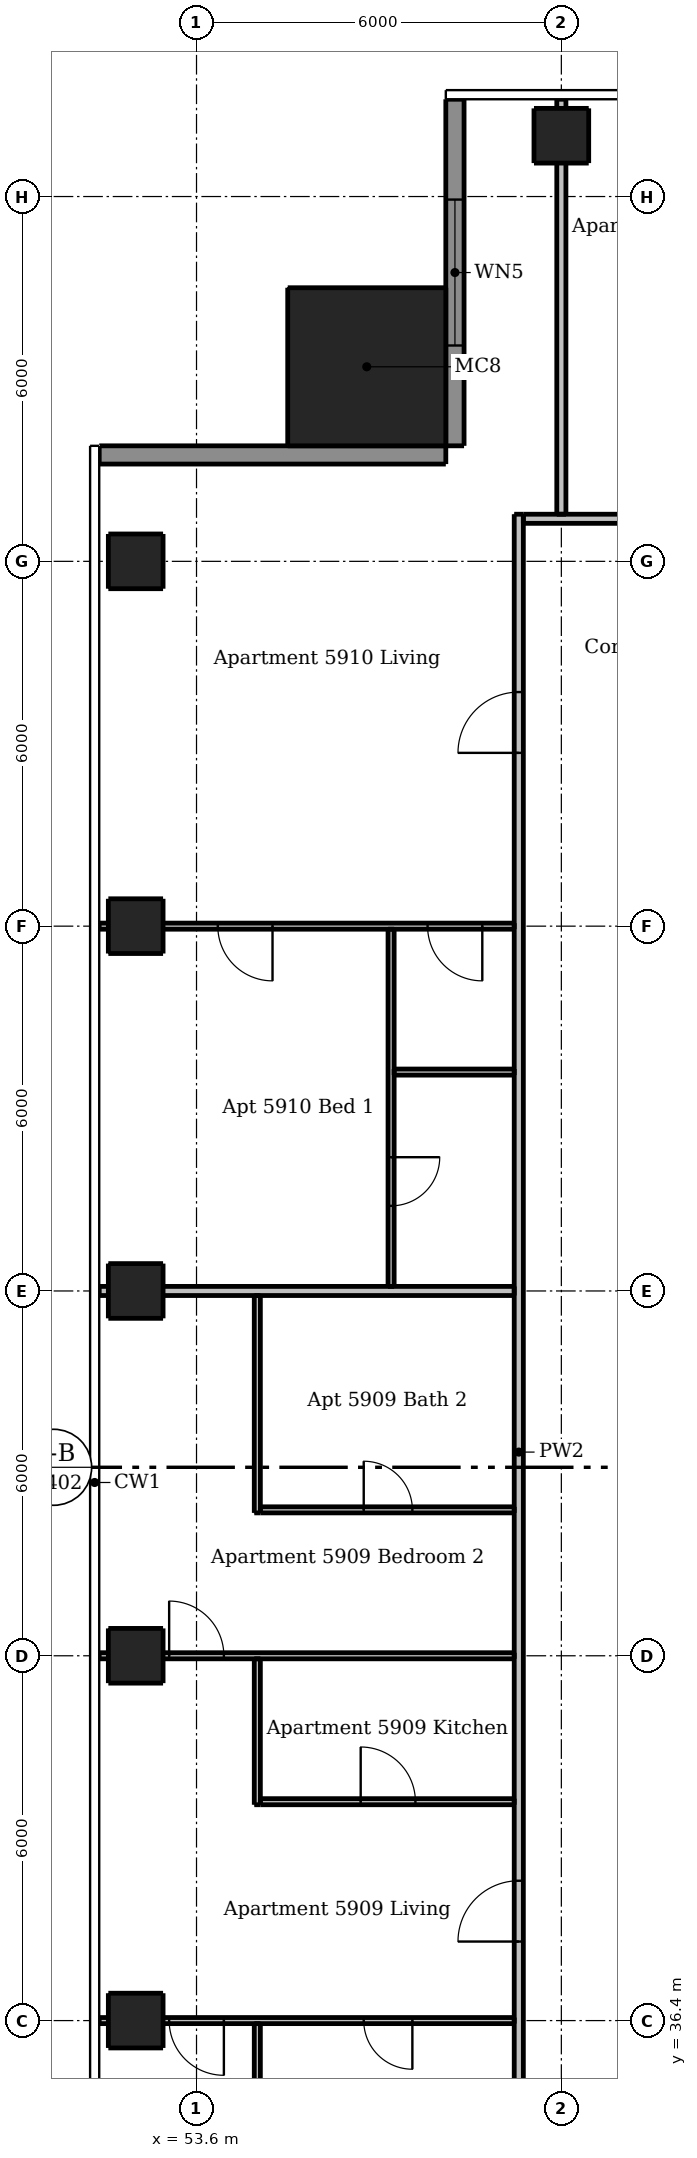
"""IFC4 building model, lengths in metres.
Left out: names, types, materials, properties, quantities, classifications, styles, units other than length and angle.
Written with IfcOpenShell. Run it as: python <this file> out.ifc"""

import sys

from ifc_helpers import new_model, si_unit, direction, frame, frame_2d, origin, origin_2d, place, context, subcontext, project, spatial, rectangle, extrude, element, fill, save


model = new_model("IFC4")
c1 = context("Model", 3, precision=1e-05, world=origin(), true_north=direction((0.0, 1.0)))
c2 = subcontext(c1, "Body", "Model", "MODEL_VIEW")
j1 = project(units=[si_unit("LENGTHUNIT", "METRE"), si_unit("PLANEANGLEUNIT", "RADIAN")], contexts=[c1])
p1 = place(None, origin())
s1 = spatial("IfcSite", under=j1, at=p1, CompositionType="ELEMENT")
p2 = place(p1, origin())
s2 = spatial("IfcBuilding", under=s1, at=p2, CompositionType="ELEMENT")
p3 = place(p2, frame((0.0, 0.0, 220.0)))
s3 = spatial("IfcBuildingStorey", under=s2, at=p3, CompositionType="ELEMENT", Elevation=220.0)
for number, where, z_axis, x_axis in (
    (1, (59.6, 67.4, 0.0), (0.0, 0.0, 1.0), (1.0, 0.0, 0.0)),
    (2, (52.6, 36.4, 0.0), (0.0, 0.0, 1.0), (1.0, 0.0, 0.0)),
    (3, (52.6, 42.4, 0.0), (0.0, 0.0, 1.0), (1.0, 0.0, 0.0)),
    (4, (52.6, 48.4, 0.0), (0.0, 0.0, 1.0), (1.0, 0.0, 0.0)),
    (5, (52.6, 54.4, 0.0), (0.0, 0.0, 1.0), (1.0, 0.0, 0.0)),
    (6, (52.6, 60.4, 0.0), (0.0, 0.0, 1.0), (1.0, 0.0, 0.0)),
):
    element("IfcColumn", number, at=place(p3, frame(where, z_axis=z_axis, x_axis=x_axis)), inside=s3, PredefinedType="COLUMN", context=c2, shape_type="SweptSolid", body=[
        extrude(rectangle(XDim=0.9, YDim=0.9, at=origin_2d()), origin(), (0.0, 0.0, 1.0), 3.05),
    ])
p4 = place(p3, frame((56.4, 63.6, 0.0), z_axis=(0.0, 0.0, 1.0), x_axis=(1.0, 0.0, 0.0)))
e7 = element("IfcColumn", 7, at=p4, inside=s3, PredefinedType="COLUMN", context=c2, shape_type="SweptSolid", body=[
    extrude(rectangle(XDim=2.6, YDim=2.6, at=origin_2d()), origin(), (0.0, 0.0, 1.0), 3.3),
])
p5 = place(p3, frame((57.85, 68.0, 0.0), z_axis=(0.0, 0.0, 1.0), x_axis=(0.0, -1.0, 0.0)))
e8 = element("IfcWall", 8, at=p5, inside=s3, PredefinedType="SOLIDWALL", context=c2, shape_type="SweptSolid", body=[
    extrude(rectangle(XDim=5.7, YDim=0.3, at=frame_2d((2.85, 0.0))), origin(), (0.0, 0.0, 1.0), 3.05),
])
p6 = place(p5, frame((1.65, 0.0, 0.15)))
e9 = element("IfcOpeningElement", 9, at=p6, cuts=e8, PredefinedType="OPENING", context=c2, shape_type="SweptSolid", body=[
    extrude(rectangle(XDim=2.4, YDim=2.1, at=frame_2d((1.2, 1.05))), frame((0.0, 0.16, 0.0), z_axis=(0.0, -1.0, 0.0), x_axis=(1.0, 0.0, 0.0)), (0.0, 0.0, 1.0), 0.32),
])
p7 = place(p3, frame((57.7, 62.15, 0.0), z_axis=(0.0, 0.0, 1.0), x_axis=(-1.0, 0.0, 0.0)))
e10 = element("IfcWall", 10, at=p7, inside=s3, PredefinedType="SOLIDWALL", context=c2, shape_type="SweptSolid", body=[
    extrude(rectangle(XDim=5.7, YDim=0.3, at=frame_2d((2.85, 0.0))), origin(), (0.0, 0.0, 1.0), 3.05),
])
p8 = place(p3, frame((54.6, 32.75, 0.0), z_axis=(0.0, 0.0, 1.0), x_axis=(0.0, 1.0, 0.0)))
e11 = element("IfcWall", 11, at=p8, inside=s3, PredefinedType="PARTITIONING", context=c2, shape_type="SweptSolid", body=[
    extrude(rectangle(XDim=3.6, YDim=0.1, at=frame_2d((1.8, 0.0))), origin(), (0.0, 0.0, 1.0), 3.05),
])
p9 = place(p3, frame((54.6, 39.95, 0.0), z_axis=(0.0, 0.0, 1.0), x_axis=(0.0, 1.0, 0.0)))
e12 = element("IfcWall", 12, at=p9, inside=s3, PredefinedType="PARTITIONING", context=c2, shape_type="SweptSolid", body=[
    extrude(rectangle(XDim=2.4, YDim=0.1, at=frame_2d((1.2, 0.0))), origin(), (0.0, 0.0, 1.0), 3.05),
])
p10 = place(p3, frame((54.6, 44.75, 0.0), z_axis=(0.0, 0.0, 1.0), x_axis=(0.0, 1.0, 0.0)))
e13 = element("IfcWall", 13, at=p10, inside=s3, PredefinedType="PARTITIONING", context=c2, shape_type="SweptSolid", body=[
    extrude(rectangle(XDim=3.575, YDim=0.1, at=frame_2d((1.788, 0.0))), origin(), (0.0, 0.0, 1.0), 3.05),
])
p11 = place(p3, frame((56.8, 54.35, 0.0), z_axis=(0.0, 0.0, 1.0), x_axis=(0.0, -1.0, 0.0)))
e14 = element("IfcWall", 14, at=p11, inside=s3, PredefinedType="PARTITIONING", context=c2, shape_type="SweptSolid", body=[
    extrude(rectangle(XDim=5.875, YDim=0.1, at=frame_2d((2.938, 0.0))), origin(), (0.0, 0.0, 1.0), 3.05),
])
p12 = place(p11, frame((3.75, 0.0, 0.0)))
e15 = element("IfcOpeningElement", 15, at=p12, cuts=e14, PredefinedType="OPENING", context=c2, shape_type="SweptSolid", body=[
    extrude(rectangle(XDim=0.8, YDim=2.1, at=frame_2d((0.4, 1.05))), frame((0.0, 0.06, 0.0), z_axis=(0.0, -1.0, 0.0), x_axis=(1.0, 0.0, 0.0)), (0.0, 0.0, 1.0), 0.12),
])
p13 = place(p3, frame((58.825, 54.4, 0.0), z_axis=(0.0, 0.0, 1.0), x_axis=(-1.0, 0.0, 0.0)))
e16 = element("IfcWall", 16, at=p13, inside=s3, PredefinedType="PARTITIONING", context=c2, shape_type="SweptSolid", body=[
    extrude(rectangle(XDim=6.825, YDim=0.1, at=frame_2d((3.413, 0.0))), origin(), (0.0, 0.0, 1.0), 2.516),
])
p14 = place(p13, frame((0.525, 0.0, 0.0)))
e17 = element("IfcOpeningElement", 17, at=p14, cuts=e16, PredefinedType="OPENING", context=c2, shape_type="SweptSolid", body=[
    extrude(rectangle(XDim=0.9, YDim=2.1, at=frame_2d((0.45, 1.05))), frame((0.0, 0.06, 0.0), z_axis=(0.0, -1.0, 0.0), x_axis=(1.0, 0.0, 0.0)), (0.0, 0.0, 1.0), 0.12),
])
p15 = place(p13, frame((3.975, 0.0, 0.0)))
e18 = element("IfcOpeningElement", 18, at=p15, cuts=e16, PredefinedType="OPENING", context=c2, shape_type="SweptSolid", body=[
    extrude(rectangle(XDim=0.9, YDim=2.1, at=frame_2d((0.45, 1.05))), frame((0.0, 0.06, 0.0), z_axis=(0.0, -1.0, 0.0), x_axis=(1.0, 0.0, 0.0)), (0.0, 0.0, 1.0), 0.12),
])
p16 = place(p3, frame((56.85, 52.0, 0.0), z_axis=(0.0, 0.0, 1.0), x_axis=(1.0, 0.0, 0.0)))
e19 = element("IfcWall", 19, at=p16, inside=s3, PredefinedType="PARTITIONING", context=c2, shape_type="SweptSolid", body=[
    extrude(rectangle(XDim=1.975, YDim=0.1, at=frame_2d((0.987, 0.0))), origin(), (0.0, 0.0, 1.0), 3.05),
])
p17 = place(p3, frame((54.65, 44.8, 0.0), z_axis=(0.0, 0.0, 1.0), x_axis=(1.0, 0.0, 0.0)))
e20 = element("IfcWall", 20, at=p17, inside=s3, PredefinedType="PARTITIONING", context=c2, shape_type="SweptSolid", body=[
    extrude(rectangle(XDim=4.175, YDim=0.1, at=frame_2d((2.087, 0.0))), origin(), (0.0, 0.0, 1.0), 3.05),
])
p18 = place(p17, frame((1.7, 0.0, 0.0)))
e21 = element("IfcOpeningElement", 21, at=p18, cuts=e20, PredefinedType="OPENING", context=c2, shape_type="SweptSolid", body=[
    extrude(rectangle(XDim=0.8, YDim=2.1, at=frame_2d((0.4, 1.05))), frame((0.0, 0.06, 0.0), z_axis=(0.0, -1.0, 0.0), x_axis=(1.0, 0.0, 0.0)), (0.0, 0.0, 1.0), 0.12),
])
p19 = place(p3, frame((52.0, 42.4, 0.0), z_axis=(0.0, 0.0, 1.0), x_axis=(1.0, 0.0, 0.0)))
e22 = element("IfcWall", 22, at=p19, inside=s3, PredefinedType="PARTITIONING", context=c2, shape_type="SweptSolid", body=[
    extrude(rectangle(XDim=6.825, YDim=0.1, at=frame_2d((3.413, 0.0))), origin(), (0.0, 0.0, 1.0), 2.516),
])
p20 = place(p19, frame((1.15, 0.0, 0.0)))
e23 = element("IfcOpeningElement", 23, at=p20, cuts=e22, PredefinedType="OPENING", context=c2, shape_type="SweptSolid", body=[
    extrude(rectangle(XDim=0.9, YDim=2.1, at=frame_2d((0.45, 1.05))), frame((0.0, 0.06, 0.0), z_axis=(0.0, -1.0, 0.0), x_axis=(1.0, 0.0, 0.0)), (0.0, 0.0, 1.0), 0.12),
])
p21 = place(p3, frame((54.65, 40.0, 0.0), z_axis=(0.0, 0.0, 1.0), x_axis=(1.0, 0.0, 0.0)))
e24 = element("IfcWall", 24, at=p21, inside=s3, PredefinedType="PARTITIONING", context=c2, shape_type="SweptSolid", body=[
    extrude(rectangle(XDim=4.175, YDim=0.1, at=frame_2d((2.087, 0.0))), origin(), (0.0, 0.0, 1.0), 3.05),
])
p22 = place(p21, frame((1.65, 0.0, 0.0)))
e25 = element("IfcOpeningElement", 25, at=p22, cuts=e24, PredefinedType="OPENING", context=c2, shape_type="SweptSolid", body=[
    extrude(rectangle(XDim=0.9, YDim=2.1, at=frame_2d((0.45, 1.05))), frame((0.0, 0.06, 0.0), z_axis=(0.0, -1.0, 0.0), x_axis=(1.0, 0.0, 0.0)), (0.0, 0.0, 1.0), 0.12),
])
p23 = place(p3, frame((58.825, 36.4, 0.0), z_axis=(0.0, 0.0, 1.0), x_axis=(-1.0, 0.0, 0.0)))
e26 = element("IfcWall", 26, at=p23, inside=s3, PredefinedType="PARTITIONING", context=c2, shape_type="SweptSolid", body=[
    extrude(rectangle(XDim=6.825, YDim=0.1, at=frame_2d((3.413, 0.0))), origin(), (0.0, 0.0, 1.0), 2.516),
])
p24 = place(p23, frame((4.775, 0.0, 0.0)))
e27 = element("IfcOpeningElement", 27, at=p24, cuts=e26, PredefinedType="OPENING", context=c2, shape_type="SweptSolid", body=[
    extrude(rectangle(XDim=0.9, YDim=2.1, at=frame_2d((0.45, 1.05))), frame((0.0, 0.06, 0.0), z_axis=(0.0, -1.0, 0.0), x_axis=(1.0, 0.0, 0.0)), (0.0, 0.0, 1.0), 0.12),
])
p25 = place(p23, frame((1.675, 0.0, 0.0)))
e28 = element("IfcOpeningElement", 28, at=p25, cuts=e26, PredefinedType="OPENING", context=c2, shape_type="SweptSolid", body=[
    extrude(rectangle(XDim=0.8, YDim=2.1, at=frame_2d((0.4, 1.05))), frame((0.0, 0.06, 0.0), z_axis=(0.0, -1.0, 0.0), x_axis=(1.0, 0.0, 0.0)), (0.0, 0.0, 1.0), 0.12),
])
p26 = place(p3, frame((58.9, 30.325, 0.0), z_axis=(0.0, 0.0, 1.0), x_axis=(0.0, 1.0, 0.0)))
e29 = element("IfcWall", 29, at=p26, inside=s3, PredefinedType="PARTITIONING", context=c2, shape_type="SweptSolid", body=[
    extrude(rectangle(XDim=30.85, YDim=0.15, at=frame_2d((15.425, 0.0))), origin(), (0.0, 0.0, 1.0), 3.05),
])
p27 = place(p26, frame((7.375, 0.0, 0.0)))
e30 = element("IfcOpeningElement", 30, at=p27, cuts=e29, PredefinedType="OPENING", context=c2, shape_type="SweptSolid", body=[
    extrude(rectangle(XDim=1.0, YDim=2.1, at=frame_2d((0.5, 1.05))), frame((0.0, 0.085, 0.0), z_axis=(0.0, -1.0, 0.0), x_axis=(1.0, 0.0, 0.0)), (0.0, 0.0, 1.0), 0.17),
])
p28 = place(p26, frame((26.925, 0.0, 0.0)))
e31 = element("IfcOpeningElement", 31, at=p28, cuts=e29, PredefinedType="OPENING", context=c2, shape_type="SweptSolid", body=[
    extrude(rectangle(XDim=1.0, YDim=2.1, at=frame_2d((0.5, 1.05))), frame((0.0, 0.085, 0.0), z_axis=(0.0, -1.0, 0.0), x_axis=(1.0, 0.0, 0.0)), (0.0, 0.0, 1.0), 0.17),
])
p29 = place(p3, frame((59.6, 61.175, 0.0), z_axis=(0.0, 0.0, 1.0), x_axis=(0.0, 1.0, 0.0)))
e32 = element("IfcWall", 32, at=p29, inside=s3, PredefinedType="PARTITIONING", context=c2, shape_type="SweptSolid", body=[
    extrude(rectangle(XDim=6.825, YDim=0.15, at=frame_2d((3.413, 0.0))), origin(), (0.0, 0.0, 1.0), 2.51),
])
p30 = place(p3, frame((58.975, 61.1, 0.0), z_axis=(0.0, 0.0, 1.0), x_axis=(1.0, 0.0, 0.0)))
e33 = element("IfcWall", 33, at=p30, inside=s3, PredefinedType="PARTITIONING", context=c2, shape_type="SweptSolid", body=[
    extrude(rectangle(XDim=29.25, YDim=0.15, at=frame_2d((14.625, 0.0))), origin(), (0.0, 0.0, 1.0), 3.05),
])
p31 = place(p30, frame((7.925, 0.0, 0.0)))
e34 = element("IfcOpeningElement", 34, at=p31, cuts=e33, PredefinedType="OPENING", context=c2, shape_type="SweptSolid", body=[
    extrude(rectangle(XDim=1.0, YDim=2.1, at=frame_2d((0.5, 1.05))), frame((0.0, 0.085, 0.0), z_axis=(0.0, -1.0, 0.0), x_axis=(1.0, 0.0, 0.0)), (0.0, 0.0, 1.0), 0.17),
])
p32 = place(p30, frame((26.475, 0.0, 0.0)))
e35 = element("IfcOpeningElement", 35, at=p32, cuts=e33, PredefinedType="OPENING", context=c2, shape_type="SweptSolid", body=[
    extrude(rectangle(XDim=1.0, YDim=2.1, at=frame_2d((0.5, 1.05))), frame((0.0, 0.085, 0.0), z_axis=(0.0, -1.0, 0.0), x_axis=(1.0, 0.0, 0.0)), (0.0, 0.0, 1.0), 0.17),
])
p33 = place(p3, frame((52.0, 48.4, 0.0), z_axis=(0.0, 0.0, 1.0), x_axis=(1.0, 0.0, 0.0)))
e36 = element("IfcWall", 36, at=p33, inside=s3, PredefinedType="PARTITIONING", context=c2, shape_type="SweptSolid", body=[
    extrude(rectangle(XDim=6.825, YDim=0.15, at=frame_2d((3.413, 0.0))), origin(), (0.0, 0.0, 1.0), 2.516),
])
p34 = place(p6, origin())
e37 = element("IfcWindow", 37, at=p34, inside=s3, PartitioningType="DOUBLE_PANEL_VERTICAL", PredefinedType="WINDOW", context=c2, shape_type="SweptSolid", body=[
    extrude(rectangle(XDim=2.4, YDim=2.1, at=frame_2d((1.2, 1.05))), frame((0.0, 0.03, 0.0), z_axis=(0.0, -1.0, 0.0), x_axis=(1.0, 0.0, 0.0)), (0.0, 0.0, 1.0), 0.06),
])
fill(e9, e37)
p35 = place(p27, origin())
e38 = element("IfcDoor", 38, at=p35, inside=s3, OperationType="SINGLE_SWING_LEFT", PredefinedType="DOOR", context=c2, shape_type="SweptSolid", body=[
    extrude(rectangle(XDim=1.0, YDim=2.1, at=frame_2d((0.5, 1.05))), frame((0.0, 0.025, 0.0), z_axis=(0.0, -1.0, 0.0), x_axis=(1.0, 0.0, 0.0)), (0.0, 0.0, 1.0), 0.05),
])
fill(e30, e38)
p36 = place(p22, origin())
e39 = element("IfcDoor", 39, at=p36, inside=s3, OperationType="SINGLE_SWING_LEFT", PredefinedType="DOOR", context=c2, shape_type="SweptSolid", body=[
    extrude(rectangle(XDim=0.9, YDim=2.1, at=frame_2d((0.45, 1.05))), frame((0.0, 0.025, 0.0), z_axis=(0.0, -1.0, 0.0), x_axis=(1.0, 0.0, 0.0)), (0.0, 0.0, 1.0), 0.05),
])
fill(e25, e39)
p37 = place(p24, origin())
e40 = element("IfcDoor", 40, at=p37, inside=s3, OperationType="SINGLE_SWING_LEFT", PredefinedType="DOOR", context=c2, shape_type="SweptSolid", body=[
    extrude(rectangle(XDim=0.9, YDim=2.1, at=frame_2d((0.45, 1.05))), frame((0.0, 0.025, 0.0), z_axis=(0.0, -1.0, 0.0), x_axis=(1.0, 0.0, 0.0)), (0.0, 0.0, 1.0), 0.05),
])
fill(e27, e40)
p38 = place(p25, origin())
e41 = element("IfcDoor", 41, at=p38, inside=s3, OperationType="SINGLE_SWING_LEFT", PredefinedType="DOOR", context=c2, shape_type="SweptSolid", body=[
    extrude(rectangle(XDim=0.8, YDim=2.1, at=frame_2d((0.4, 1.05))), frame((0.0, 0.025, 0.0), z_axis=(0.0, -1.0, 0.0), x_axis=(1.0, 0.0, 0.0)), (0.0, 0.0, 1.0), 0.05),
])
fill(e28, e41)
p39 = place(p20, origin())
e42 = element("IfcDoor", 42, at=p39, inside=s3, OperationType="SINGLE_SWING_LEFT", PredefinedType="DOOR", context=c2, shape_type="SweptSolid", body=[
    extrude(rectangle(XDim=0.9, YDim=2.1, at=frame_2d((0.45, 1.05))), frame((0.0, 0.025, 0.0), z_axis=(0.0, -1.0, 0.0), x_axis=(1.0, 0.0, 0.0)), (0.0, 0.0, 1.0), 0.05),
])
fill(e23, e42)
p40 = place(p18, origin())
e43 = element("IfcDoor", 43, at=p40, inside=s3, OperationType="SINGLE_SWING_LEFT", PredefinedType="DOOR", context=c2, shape_type="SweptSolid", body=[
    extrude(rectangle(XDim=0.8, YDim=2.1, at=frame_2d((0.4, 1.05))), frame((0.0, 0.025, 0.0), z_axis=(0.0, -1.0, 0.0), x_axis=(1.0, 0.0, 0.0)), (0.0, 0.0, 1.0), 0.05),
])
fill(e21, e43)
p41 = place(p28, origin())
e44 = element("IfcDoor", 44, at=p41, inside=s3, OperationType="SINGLE_SWING_LEFT", PredefinedType="DOOR", context=c2, shape_type="SweptSolid", body=[
    extrude(rectangle(XDim=1.0, YDim=2.1, at=frame_2d((0.5, 1.05))), frame((0.0, 0.025, 0.0), z_axis=(0.0, -1.0, 0.0), x_axis=(1.0, 0.0, 0.0)), (0.0, 0.0, 1.0), 0.05),
])
fill(e31, e44)
p42 = place(p14, origin())
e45 = element("IfcDoor", 45, at=p42, inside=s3, OperationType="SINGLE_SWING_LEFT", PredefinedType="DOOR", context=c2, shape_type="SweptSolid", body=[
    extrude(rectangle(XDim=0.9, YDim=2.1, at=frame_2d((0.45, 1.05))), frame((0.0, 0.025, 0.0), z_axis=(0.0, -1.0, 0.0), x_axis=(1.0, 0.0, 0.0)), (0.0, 0.0, 1.0), 0.05),
])
fill(e17, e45)
p43 = place(p15, origin())
e46 = element("IfcDoor", 46, at=p43, inside=s3, OperationType="SINGLE_SWING_LEFT", PredefinedType="DOOR", context=c2, shape_type="SweptSolid", body=[
    extrude(rectangle(XDim=0.9, YDim=2.1, at=frame_2d((0.45, 1.05))), frame((0.0, 0.025, 0.0), z_axis=(0.0, -1.0, 0.0), x_axis=(1.0, 0.0, 0.0)), (0.0, 0.0, 1.0), 0.05),
])
fill(e18, e46)
p44 = place(p12, origin())
e47 = element("IfcDoor", 47, at=p44, inside=s3, OperationType="SINGLE_SWING_LEFT", PredefinedType="DOOR", context=c2, shape_type="SweptSolid", body=[
    extrude(rectangle(XDim=0.8, YDim=2.1, at=frame_2d((0.4, 1.05))), frame((0.0, 0.025, 0.0), z_axis=(0.0, -1.0, 0.0), x_axis=(1.0, 0.0, 0.0)), (0.0, 0.0, 1.0), 0.05),
])
fill(e15, e47)
save(model, sys.argv[1])
